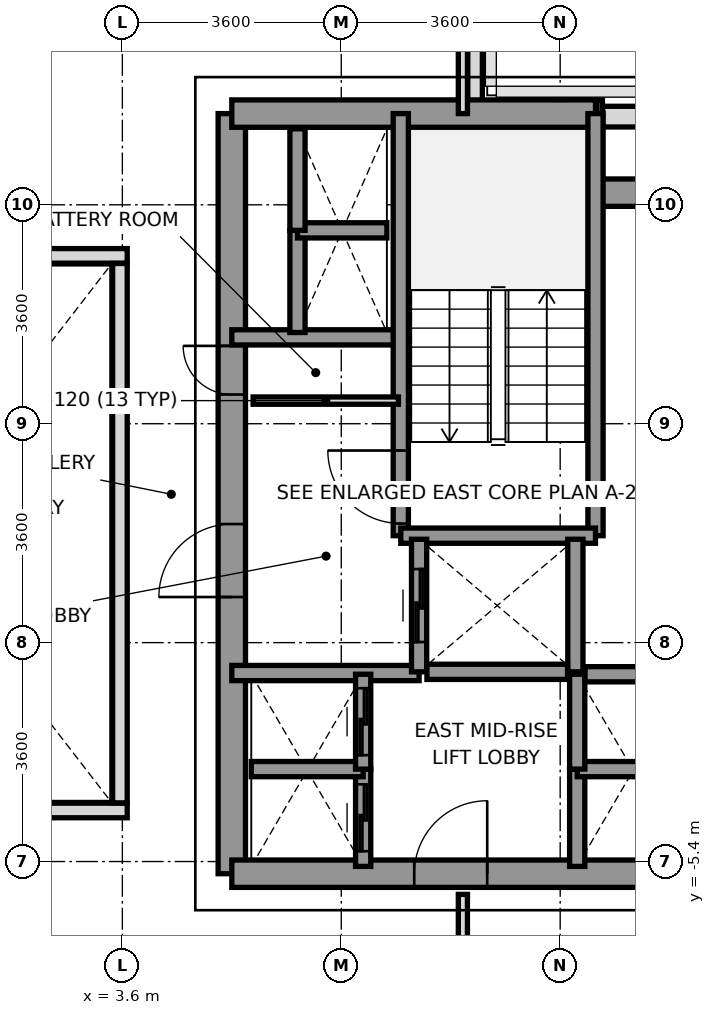
"""IFC4 building model, lengths in metres.
Left out: names, types, materials, properties, quantities, classifications, styles, units other than length and angle.
Written with IfcOpenShell. Run it as: python <this file> out.ifc"""

import sys

from ifc_helpers import new_model, si_unit, direction, frame, frame_2d, origin, place, context, subcontext, project, spatial, rectangle, extrude, source, transform, mapped, element, fill, save


model = new_model("IFC4")
c1 = context("Model", 3, precision=1e-05, world=origin(), true_north=direction((0.0, 1.0)))
c2 = subcontext(c1, "Body", "Model", "MODEL_VIEW")
j1 = project(units=[si_unit("LENGTHUNIT", "METRE"), si_unit("PLANEANGLEUNIT", "RADIAN")], contexts=[c1])
p1 = place(None, origin())
s1 = spatial("IfcSite", under=j1, at=p1, CompositionType="ELEMENT")
p2 = place(p1, origin())
s2 = spatial("IfcBuilding", under=s1, at=p2, CompositionType="ELEMENT")
p3 = place(p2, frame((0.0, 0.0, 97.2)))
s3 = spatial("IfcBuildingStorey", under=s2, at=p3, CompositionType="ELEMENT", Elevation=97.2)
p4 = place(p3, frame((11.498, 6.85, 0.0), z_axis=(0.0, 0.0, 1.0), x_axis=(1.0, 0.0, 0.0)))
e1 = element("IfcWall", 1, at=p4, inside=s3, PredefinedType="SOLIDWALL", context=c2, shape_type="SweptSolid", body=[
    extrude(rectangle(XDim=2.585, YDim=0.34, at=frame_2d((1.292, 0.0))), origin(), (0.0, 0.0, 1.0), 3.2),
])
p5 = place(p3, frame((9.4, 8.472, 0.0), z_axis=(0.0, 0.0, 1.0), x_axis=(0.0, -1.0, 0.0)))
e2 = element("IfcWall", 2, at=p5, inside=s3, PredefinedType="PARAPET", context=c2, shape_type="SweptSolid", body=[
    extrude(rectangle(XDim=1.519, YDim=0.24, at=frame_2d((0.76, 0.0))), origin(), (0.0, 0.0, 1.0), 1.15),
])
p6 = place(p3, frame((11.403, 7.0, 0.0), z_axis=(0.0, 0.0, 1.0), x_axis=(1.0, 0.0, 0.0)))
e3 = element("IfcWall", 3, at=p6, inside=s3, PredefinedType="PARAPET", context=c2, shape_type="SweptSolid", body=[
    extrude(rectangle(XDim=0.092, YDim=0.24, at=frame_2d((0.046, 0.0))), origin(), (0.0, 0.0, 1.0), 1.15),
])
p7 = place(p3, frame((5.4, -5.6, 0.0), z_axis=(0.0, 0.0, 1.0), x_axis=(0.0, 1.0, 0.0)))
e4 = element("IfcWall", 4, at=p7, inside=s3, PredefinedType="SHEAR", context=c2, shape_type="SweptSolid", body=[
    extrude(rectangle(XDim=12.5, YDim=0.45, at=frame_2d((6.25, 0.0))), origin(), (0.0, 0.0, 1.0), 3.2),
])
p8 = place(p7, frame((4.55, 0.0, 0.0)))
e5 = element("IfcOpeningElement", 5, at=p8, cuts=e4, PredefinedType="OPENING", context=c2, shape_type="SweptSolid", body=[
    extrude(rectangle(XDim=1.2, YDim=2.2, at=frame_2d((0.6, 1.1))), frame((0.0, 0.235, 0.0), z_axis=(0.0, -1.0, 0.0), x_axis=(1.0, 0.0, 0.0)), (0.0, 0.0, 1.0), 0.47),
])
p9 = place(p7, frame((7.88, 0.0, 0.0)))
e6 = element("IfcOpeningElement", 6, at=p9, cuts=e4, PredefinedType="OPENING", context=c2, shape_type="SweptSolid", body=[
    extrude(rectangle(XDim=0.8, YDim=2.1, at=frame_2d((0.4, 1.05))), frame((0.0, 0.235, 0.0), z_axis=(0.0, -1.0, 0.0), x_axis=(1.0, 0.0, 0.0)), (0.0, 0.0, 1.0), 0.47),
])
p10 = place(p3, frame((5.4, 6.9, 0.0), z_axis=(0.0, 0.0, 1.0), x_axis=(1.0, 0.0, 0.0)))
e7 = element("IfcWall", 7, at=p10, inside=s3, PredefinedType="SHEAR", context=c2, shape_type="SweptSolid", body=[
    extrude(rectangle(XDim=5.981, YDim=0.45, at=frame_2d((2.991, 0.0))), origin(), (0.0, 0.0, 1.0), 3.2),
])
p11 = place(p3, frame((11.381, 5.6, 0.0), z_axis=(0.0, 0.0, 1.0), x_axis=(1.0, 0.0, 0.0)))
e8 = element("IfcWall", 8, at=p11, inside=s3, PredefinedType="SHEAR", context=c2, shape_type="SweptSolid", body=[
    extrude(rectangle(XDim=1.819, YDim=0.45, at=frame_2d((0.909, 0.0))), origin(), (0.0, 0.0, 1.0), 3.2),
])
p12 = place(p3, frame((5.4, -5.6, 0.0), z_axis=(0.0, 0.0, 1.0), x_axis=(1.0, 0.0, 0.0)))
e9 = element("IfcWall", 9, at=p12, inside=s3, PredefinedType="SHEAR", context=c2, shape_type="SweptSolid", body=[
    extrude(rectangle(XDim=7.8, YDim=0.45, at=frame_2d((3.9, 0.0))), origin(), (0.0, 0.0, 1.0), 3.2),
])
p13 = place(p12, frame((3.0, 0.0, 0.0)))
e10 = element("IfcOpeningElement", 10, at=p13, cuts=e9, PredefinedType="OPENING", context=c2, shape_type="SweptSolid", body=[
    extrude(rectangle(XDim=1.2, YDim=2.2, at=frame_2d((0.6, 1.1))), frame((0.0, 0.235, 0.0), z_axis=(0.0, -1.0, 0.0), x_axis=(1.0, 0.0, 0.0)), (0.0, 0.0, 1.0), 0.47),
])
p14 = place(p3, frame((5.4, 3.22, 0.0), z_axis=(0.0, 0.0, 1.0), x_axis=(1.0, 0.0, 0.0)))
e11 = element("IfcWall", 11, at=p14, inside=s3, PredefinedType="SOLIDWALL", context=c2, shape_type="SweptSolid", body=[
    extrude(rectangle(XDim=2.78, YDim=0.25, at=frame_2d((1.39, 0.0))), origin(), (0.0, 0.0, 1.0), 3.2),
])
p15 = place(p3, frame((5.4, -2.3, 0.0), z_axis=(0.0, 0.0, 1.0), x_axis=(1.0, 0.0, 0.0)))
e12 = element("IfcWall", 12, at=p15, inside=s3, PredefinedType="SOLIDWALL", context=c2, shape_type="SweptSolid", body=[
    extrude(rectangle(XDim=3.08, YDim=0.25, at=frame_2d((1.54, 0.0))), origin(), (0.0, 0.0, 1.0), 3.2),
])
p16 = place(p3, frame((8.179, -0.041, 0.0), z_axis=(0.0, 0.0, 1.0), x_axis=(0.0, 1.0, 0.0)))
e13 = element("IfcWall", 13, at=p16, inside=s3, PredefinedType="SOLIDWALL", context=c2, shape_type="SweptSolid", body=[
    extrude(rectangle(XDim=6.941, YDim=0.25, at=frame_2d((3.47, 0.0))), origin(), (0.0, 0.0, 1.0), 3.2),
])
p17 = place(p16, frame((0.2, 0.0, 0.0)))
e14 = element("IfcOpeningElement", 14, at=p17, cuts=e13, PredefinedType="OPENING", context=c2, shape_type="SweptSolid", body=[
    extrude(rectangle(XDim=1.2, YDim=2.2, at=frame_2d((0.6, 1.1))), frame((0.0, 0.135, 0.0), z_axis=(0.0, -1.0, 0.0), x_axis=(1.0, 0.0, 0.0)), (0.0, 0.0, 1.0), 0.27),
])
p18 = place(p3, frame((11.381, -0.041, 0.0), z_axis=(0.0, 0.0, 1.0), x_axis=(0.0, 1.0, 0.0)))
e15 = element("IfcWall", 15, at=p18, inside=s3, PredefinedType="SOLIDWALL", context=c2, shape_type="SweptSolid", body=[
    extrude(rectangle(XDim=6.941, YDim=0.25, at=frame_2d((3.47, 0.0))), origin(), (0.0, 0.0, 1.0), 3.2),
])
p19 = place(p3, frame((8.179, -0.041, 0.0), z_axis=(0.0, 0.0, 1.0), x_axis=(1.0, 0.0, 0.0)))
e16 = element("IfcWall", 16, at=p19, inside=s3, PredefinedType="SOLIDWALL", context=c2, shape_type="SweptSolid", body=[
    extrude(rectangle(XDim=3.202, YDim=0.25, at=frame_2d((1.601, 0.0))), origin(), (0.0, 0.0, 1.0), 3.2),
])
p20 = place(p3, frame((8.48, -2.28, 0.0), z_axis=(0.0, 0.0, 1.0), x_axis=(0.0, 1.0, 0.0)))
e17 = element("IfcWall", 17, at=p20, inside=s3, PredefinedType="SOLIDWALL", context=c2, shape_type="SweptSolid", body=[
    extrude(rectangle(XDim=2.18, YDim=0.25, at=frame_2d((1.09, 0.0))), origin(), (0.0, 0.0, 1.0), 3.2),
])
p21 = place(p20, frame((0.49, 0.0, 0.0)))
e18 = element("IfcOpeningElement", 18, at=p21, cuts=e17, PredefinedType="OPENING", context=c2, shape_type="SweptSolid", body=[
    extrude(rectangle(XDim=1.2, YDim=2.2, at=frame_2d((0.6, 1.1))), frame((0.0, 0.135, 0.0), z_axis=(0.0, -1.0, 0.0), x_axis=(1.0, 0.0, 0.0)), (0.0, 0.0, 1.0), 0.27),
])
p22 = place(p3, frame((11.05, -2.28, 0.0), z_axis=(0.0, 0.0, 1.0), x_axis=(0.0, 1.0, 0.0)))
e19 = element("IfcWall", 19, at=p22, inside=s3, PredefinedType="SOLIDWALL", context=c2, shape_type="SweptSolid", body=[
    extrude(rectangle(XDim=2.18, YDim=0.25, at=frame_2d((1.09, 0.0))), origin(), (0.0, 0.0, 1.0), 3.2),
])
p23 = place(p3, frame((8.609, -2.28, 0.0), z_axis=(0.0, 0.0, 1.0), x_axis=(1.0, 0.0, 0.0)))
e20 = element("IfcWall", 20, at=p23, inside=s3, PredefinedType="SOLIDWALL", context=c2, shape_type="SweptSolid", body=[
    extrude(rectangle(XDim=2.312, YDim=0.25, at=frame_2d((1.156, 0.0))), origin(), (0.0, 0.0, 1.0), 3.2),
])
p24 = place(p3, frame((11.08, -5.48, 0.0), z_axis=(0.0, 0.0, 1.0), x_axis=(0.0, 1.0, 0.0)))
e21 = element("IfcWall", 21, at=p24, inside=s3, PredefinedType="SOLIDWALL", context=c2, shape_type="SweptSolid", body=[
    extrude(rectangle(XDim=1.6, YDim=0.25, at=frame_2d((0.8, 0.0))), origin(), (0.0, 0.0, 1.0), 3.2),
])
p25 = place(p3, frame((11.08, -3.88, 0.0), z_axis=(0.0, 0.0, 1.0), x_axis=(1.0, 0.0, 0.0)))
e22 = element("IfcWall", 22, at=p25, inside=s3, PredefinedType="SOLIDWALL", context=c2, shape_type="SweptSolid", body=[
    extrude(rectangle(XDim=1.84, YDim=0.25, at=frame_2d((0.92, 0.0))), origin(), (0.0, 0.0, 1.0), 3.2),
])
p26 = place(p3, frame((11.08, -3.88, 0.0), z_axis=(0.0, 0.0, 1.0), x_axis=(0.0, 1.0, 0.0)))
e23 = element("IfcWall", 23, at=p26, inside=s3, PredefinedType="SOLIDWALL", context=c2, shape_type="SweptSolid", body=[
    extrude(rectangle(XDim=1.56, YDim=0.25, at=frame_2d((0.78, 0.0))), origin(), (0.0, 0.0, 1.0), 3.2),
])
p27 = place(p3, frame((11.209, -2.32, 0.0), z_axis=(0.0, 0.0, 1.0), x_axis=(1.0, 0.0, 0.0)))
e24 = element("IfcWall", 24, at=p27, inside=s3, PredefinedType="SOLIDWALL", context=c2, shape_type="SweptSolid", body=[
    extrude(rectangle(XDim=1.582, YDim=0.25, at=frame_2d((0.791, 0.0))), origin(), (0.0, 0.0, 1.0), 3.2),
])
p28 = place(p3, frame((7.56, -5.48, 0.0), z_axis=(0.0, 0.0, 1.0), x_axis=(0.0, 1.0, 0.0)))
e25 = element("IfcWall", 25, at=p28, inside=s3, PredefinedType="SOLIDWALL", context=c2, shape_type="SweptSolid", body=[
    extrude(rectangle(XDim=1.6, YDim=0.25, at=frame_2d((0.8, 0.0))), origin(), (0.0, 0.0, 1.0), 3.2),
])
p29 = place(p28, frame((0.25, 0.0, 0.0)))
e26 = element("IfcOpeningElement", 26, at=p29, cuts=e25, PredefinedType="OPENING", context=c2, shape_type="SweptSolid", body=[
    extrude(rectangle(XDim=1.1, YDim=2.2, at=frame_2d((0.55, 1.1))), frame((0.0, 0.135, 0.0), z_axis=(0.0, -1.0, 0.0), x_axis=(1.0, 0.0, 0.0)), (0.0, 0.0, 1.0), 0.27),
])
p30 = place(p3, frame((5.72, -3.88, 0.0), z_axis=(0.0, 0.0, 1.0), x_axis=(1.0, 0.0, 0.0)))
e27 = element("IfcWall", 27, at=p30, inside=s3, PredefinedType="SOLIDWALL", context=c2, shape_type="SweptSolid", body=[
    extrude(rectangle(XDim=1.84, YDim=0.25, at=frame_2d((0.92, 0.0))), origin(), (0.0, 0.0, 1.0), 3.2),
])
p31 = place(p3, frame((7.56, -3.88, 0.0), z_axis=(0.0, 0.0, 1.0), x_axis=(0.0, 1.0, 0.0)))
e28 = element("IfcWall", 28, at=p31, inside=s3, PredefinedType="SOLIDWALL", context=c2, shape_type="SweptSolid", body=[
    extrude(rectangle(XDim=1.56, YDim=0.25, at=frame_2d((0.78, 0.0))), origin(), (0.0, 0.0, 1.0), 3.2),
])
p32 = place(p31, frame((0.23, 0.0, 0.0)))
e29 = element("IfcOpeningElement", 29, at=p32, cuts=e28, PredefinedType="OPENING", context=c2, shape_type="SweptSolid", body=[
    extrude(rectangle(XDim=1.1, YDim=2.2, at=frame_2d((0.55, 1.1))), frame((0.0, 0.135, 0.0), z_axis=(0.0, -1.0, 0.0), x_axis=(1.0, 0.0, 0.0)), (0.0, 0.0, 1.0), 0.27),
])
p33 = place(p3, frame((6.48, 3.3, 0.0), z_axis=(0.0, 0.0, 1.0), x_axis=(0.0, 1.0, 0.0)))
e30 = element("IfcWall", 30, at=p33, inside=s3, PredefinedType="SOLIDWALL", context=c2, shape_type="SweptSolid", body=[
    extrude(rectangle(XDim=1.68, YDim=0.25, at=frame_2d((0.84, 0.0))), origin(), (0.0, 0.0, 1.0), 3.2),
])
p34 = place(p3, frame((6.48, 4.98, 0.0), z_axis=(0.0, 0.0, 1.0), x_axis=(1.0, 0.0, 0.0)))
e31 = element("IfcWall", 31, at=p34, inside=s3, PredefinedType="SOLIDWALL", context=c2, shape_type="SweptSolid", body=[
    extrude(rectangle(XDim=1.47, YDim=0.25, at=frame_2d((0.735, 0.0))), origin(), (0.0, 0.0, 1.0), 3.2),
])
p35 = place(p3, frame((6.48, 4.98, 0.0), z_axis=(0.0, 0.0, 1.0), x_axis=(0.0, 1.0, 0.0)))
e32 = element("IfcWall", 32, at=p35, inside=s3, PredefinedType="SOLIDWALL", context=c2, shape_type="SweptSolid", body=[
    extrude(rectangle(XDim=1.67, YDim=0.25, at=frame_2d((0.835, 0.0))), origin(), (0.0, 0.0, 1.0), 3.2),
])
p36 = place(p3, frame((5.75, 2.18, 0.0), z_axis=(0.0, 0.0, 1.0), x_axis=(1.0, 0.0, 0.0)))
e33 = element("IfcWall", 33, at=p36, inside=s3, PredefinedType="PARTITIONING", context=c2, shape_type="SweptSolid", body=[
    extrude(rectangle(XDim=2.39, YDim=0.12, at=frame_2d((1.195, 0.0))), origin(), (0.0, 0.0, 1.0), 2.3),
])
p37 = place(p3, frame((9.2, 6.9, 0.0), z_axis=(0.0, 0.0, 1.0), x_axis=(0.0, 1.0, 0.0)))
e34 = element("IfcWall", 34, at=p37, inside=s3, PredefinedType="PARTITIONING", context=c2, shape_type="SweptSolid", body=[
    extrude(rectangle(XDim=8.78, YDim=0.15, at=frame_2d((4.39, 0.0))), origin(), (0.0, 0.0, 1.0), 2.7),
])
p38 = place(p3, frame((9.2, -15.68, 0.0), z_axis=(0.0, 0.0, 1.0), x_axis=(0.0, 1.0, 0.0)))
e35 = element("IfcWall", 35, at=p38, inside=s3, PredefinedType="PARTITIONING", context=c2, shape_type="SweptSolid", body=[
    extrude(rectangle(XDim=9.74, YDim=0.15, at=frame_2d((4.87, 0.0))), origin(), (0.0, 0.0, 1.0), 2.7),
])
for number, where, z_axis, x_axis in (
    (36, (-3.68, -4.56, 0.0), (0.0, 0.0, 1.0), (1.0, 0.0, 0.0)),
    (37, (-3.68, 4.56, 0.0), (0.0, 0.0, 1.0), (1.0, 0.0, 0.0)),
):
    element("IfcWall", number, at=place(p3, frame(where, z_axis=z_axis, x_axis=x_axis)), inside=s3, PredefinedType="PARAPET", context=c2, shape_type="SweptSolid", body=[
        extrude(rectangle(XDim=7.36, YDim=0.24, at=frame_2d((3.68, 0.0))), origin(), (0.0, 0.0, 1.0), 1.15),
    ])
p39 = place(p3, frame((3.56, -4.435, 0.0), z_axis=(0.0, 0.0, 1.0), x_axis=(0.0, 1.0, 0.0)))
e38 = element("IfcWall", 38, at=p39, inside=s3, PredefinedType="PARAPET", context=c2, shape_type="SweptSolid", body=[
    extrude(rectangle(XDim=8.87, YDim=0.24, at=frame_2d((4.435, 0.0))), origin(), (0.0, 0.0, 1.0), 1.15),
])
m1 = source(origin(), c2, "Body", "SweptSolid", [
    extrude(rectangle(XDim=1.2, YDim=2.2, at=frame_2d((0.6, 1.1))), frame((0.0, 0.025, 0.0), z_axis=(0.0, -1.0, 0.0), x_axis=(1.0, 0.0, 0.0)), (0.0, 0.0, 1.0), 0.05),
])
p40 = place(p17, origin())
e39 = element("IfcDoor", 39, at=p40, inside=s3, OperationType="SINGLE_SWING_RIGHT", PredefinedType="DOOR", context=c2, shape_type="MappedRepresentation", body=[
    mapped(m1, transform((0.0, 0.0, 0.0), x_axis=(1.0, 0.0, 0.0), y_axis=(0.0, 1.0, 0.0), z_axis=(0.0, 0.0, 1.0), scale=1.0)),
])
fill(e14, e39)
p41 = place(p8, origin())
e40 = element("IfcDoor", 40, at=p41, inside=s3, OperationType="SINGLE_SWING_LEFT", PredefinedType="DOOR", context=c2, shape_type="MappedRepresentation", body=[
    mapped(m1, transform((0.0, 0.0, 0.0), x_axis=(1.0, 0.0, 0.0), y_axis=(0.0, 1.0, 0.0), z_axis=(0.0, 0.0, 1.0), scale=1.0)),
])
fill(e5, e40)
p42 = place(p13, origin())
e41 = element("IfcDoor", 41, at=p42, inside=s3, OperationType="SINGLE_SWING_RIGHT", PredefinedType="DOOR", context=c2, shape_type="MappedRepresentation", body=[
    mapped(m1, transform((0.0, 0.0, 0.0), x_axis=(1.0, 0.0, 0.0), y_axis=(0.0, 1.0, 0.0), z_axis=(0.0, 0.0, 1.0), scale=1.0)),
])
fill(e10, e41)
m2 = source(origin(), c2, "Body", "SweptSolid", [
    extrude(rectangle(XDim=0.8, YDim=2.1, at=frame_2d((0.4, 1.05))), frame((0.0, 0.025, 0.0), z_axis=(0.0, -1.0, 0.0), x_axis=(1.0, 0.0, 0.0)), (0.0, 0.0, 1.0), 0.05),
])
p43 = place(p9, origin())
e42 = element("IfcDoor", 42, at=p43, inside=s3, OperationType="SINGLE_SWING_RIGHT", PredefinedType="DOOR", context=c2, shape_type="MappedRepresentation", body=[
    mapped(m2, transform((0.0, 0.0, 0.0), x_axis=(1.0, 0.0, 0.0), y_axis=(0.0, 1.0, 0.0), z_axis=(0.0, 0.0, 1.0), scale=1.0)),
])
fill(e6, e42)
p44 = place(p21, origin())
e43 = element("IfcDoor", 43, at=p44, inside=s3, OperationType="SLIDING_TO_RIGHT", PredefinedType="DOOR", context=c2, shape_type="MappedRepresentation", body=[
    mapped(m1, transform((0.0, 0.0, 0.0), x_axis=(1.0, 0.0, 0.0), y_axis=(0.0, 1.0, 0.0), z_axis=(0.0, 0.0, 1.0), scale=1.0)),
])
fill(e18, e43)
m3 = source(origin(), c2, "Body", "SweptSolid", [
    extrude(rectangle(XDim=1.1, YDim=2.2, at=frame_2d((0.55, 1.1))), frame((0.0, 0.025, 0.0), z_axis=(0.0, -1.0, 0.0), x_axis=(1.0, 0.0, 0.0)), (0.0, 0.0, 1.0), 0.05),
])
p45 = place(p29, origin())
e44 = element("IfcDoor", 44, at=p45, inside=s3, OperationType="SLIDING_TO_LEFT", PredefinedType="DOOR", context=c2, shape_type="MappedRepresentation", body=[
    mapped(m3, transform((0.0, 0.0, 0.0), x_axis=(1.0, 0.0, 0.0), y_axis=(0.0, 1.0, 0.0), z_axis=(0.0, 0.0, 1.0), scale=1.0)),
])
fill(e26, e44)
p46 = place(p32, origin())
e45 = element("IfcDoor", 45, at=p46, inside=s3, OperationType="SLIDING_TO_LEFT", PredefinedType="DOOR", context=c2, shape_type="MappedRepresentation", body=[
    mapped(m3, transform((0.0, 0.0, 0.0), x_axis=(1.0, 0.0, 0.0), y_axis=(0.0, 1.0, 0.0), z_axis=(0.0, 0.0, 1.0), scale=1.0)),
])
fill(e29, e45)
save(model, sys.argv[1])
